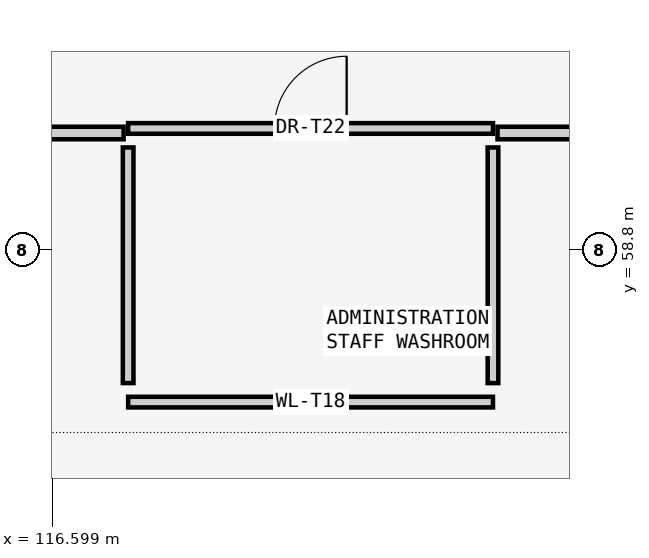
"""IFC4 building model, lengths in metres.
Left out: names, types, materials, properties, quantities, classifications, styles, units other than length and angle.
Written with IfcOpenShell. Run it as: python <this file> out.ifc"""

import sys

from ifc_helpers import new_model, si_unit, direction, frame, frame_2d, origin, place, context, subcontext, project, spatial, rectangle, extrude, element, fill, save


model = new_model("IFC4")
c1 = context("Model", 3, precision=1e-05, world=origin(), true_north=direction((0.0, 1.0)))
c2 = subcontext(c1, "Body", "Model", "MODEL_VIEW")
j1 = project(units=[si_unit("LENGTHUNIT", "METRE"), si_unit("PLANEANGLEUNIT", "RADIAN")], contexts=[c1])
p1 = place(None, origin())
s1 = spatial("IfcSite", under=j1, at=p1, CompositionType="ELEMENT")
p2 = place(p1, origin())
s2 = spatial("IfcBuilding", under=s1, at=p2, CompositionType="ELEMENT")
p3 = place(p2, frame((0.0, 0.0, 19.8)))
s3 = spatial("IfcBuildingStorey", under=s2, at=p3, CompositionType="ELEMENT", Elevation=19.8)
p4 = place(p3, frame((117.6, 56.8, 0.0), z_axis=(0.0, 0.0, 1.0), x_axis=(1.0, 0.0, 0.0)))
e1 = element("IfcWall", 1, at=p4, inside=s3, PredefinedType="PARTITIONING", context=c2, shape_type="SweptSolid", body=[
    extrude(rectangle(XDim=4.8, YDim=0.14, at=frame_2d((2.4, 0.0))), origin(), (0.0, 0.0, 1.0), 4.32),
])
p5 = place(p3, frame((117.6, 60.4, 0.0), z_axis=(0.0, 0.0, 1.0), x_axis=(1.0, 0.0, 0.0)))
e2 = element("IfcWall", 2, at=p5, inside=s3, PredefinedType="PARTITIONING", context=c2, shape_type="SweptSolid", body=[
    extrude(rectangle(XDim=4.8, YDim=0.14, at=frame_2d((2.4, 0.0))), origin(), (0.0, 0.0, 1.0), 4.32),
])
p6 = place(p5, frame((1.925, 0.0, 0.0)))
e3 = element("IfcOpeningElement", 3, at=p6, cuts=e2, PredefinedType="OPENING", context=c2, shape_type="SweptSolid", body=[
    extrude(rectangle(XDim=0.95, YDim=2.15, at=frame_2d((0.475, 1.075))), frame((0.0, 0.08, 0.0), z_axis=(0.0, -1.0, 0.0), x_axis=(1.0, 0.0, 0.0)), (0.0, 0.0, 1.0), 0.16),
])
for number, where, z_axis, x_axis in (
    (4, (117.6, 57.05, 0.0), (0.0, 0.0, 1.0), (0.0, 1.0, 0.0)),
    (5, (122.4, 57.05, 0.0), (0.0, 0.0, 1.0), (0.0, 1.0, 0.0)),
):
    element("IfcWall", number, at=place(p3, frame(where, z_axis=z_axis, x_axis=x_axis)), inside=s3, PredefinedType="PARTITIONING", context=c2, shape_type="SweptSolid", body=[
        extrude(rectangle(XDim=3.1, YDim=0.14, at=frame_2d((1.55, 0.0))), origin(), (0.0, 0.0, 1.0), 4.32),
    ])
p7 = place(p3, frame((122.46, 60.34, 0.0), z_axis=(0.0, 0.0, 1.0), x_axis=(1.0, 0.0, 0.0)))
e6 = element("IfcWall", 6, at=p7, inside=s3, PredefinedType="PARTITIONING", context=c2, shape_type="SweptSolid", body=[
    extrude(rectangle(XDim=21.29, YDim=0.165, at=frame_2d((10.645, 0.0))), origin(), (0.0, 0.0, 1.0), 4.55),
])
p8 = place(p3, frame((113.26, 60.34, 0.0), z_axis=(0.0, 0.0, 1.0), x_axis=(1.0, 0.0, 0.0)))
e7 = element("IfcWall", 7, at=p8, inside=s3, PredefinedType="PARTITIONING", context=c2, shape_type="SweptSolid", body=[
    extrude(rectangle(XDim=4.28, YDim=0.165, at=frame_2d((2.14, 0.0))), origin(), (0.0, 0.0, 1.0), 4.55),
])
p9 = place(p6, origin())
e8 = element("IfcDoor", 8, at=p9, inside=s3, OperationType="SINGLE_SWING_RIGHT", PredefinedType="DOOR", context=c2, shape_type="SweptSolid", body=[
    extrude(rectangle(XDim=0.95, YDim=2.15, at=frame_2d((0.475, 1.075))), frame((0.0, 0.025, 0.0), z_axis=(0.0, -1.0, 0.0), x_axis=(1.0, 0.0, 0.0)), (0.0, 0.0, 1.0), 0.05),
])
fill(e3, e8)
save(model, sys.argv[1])
